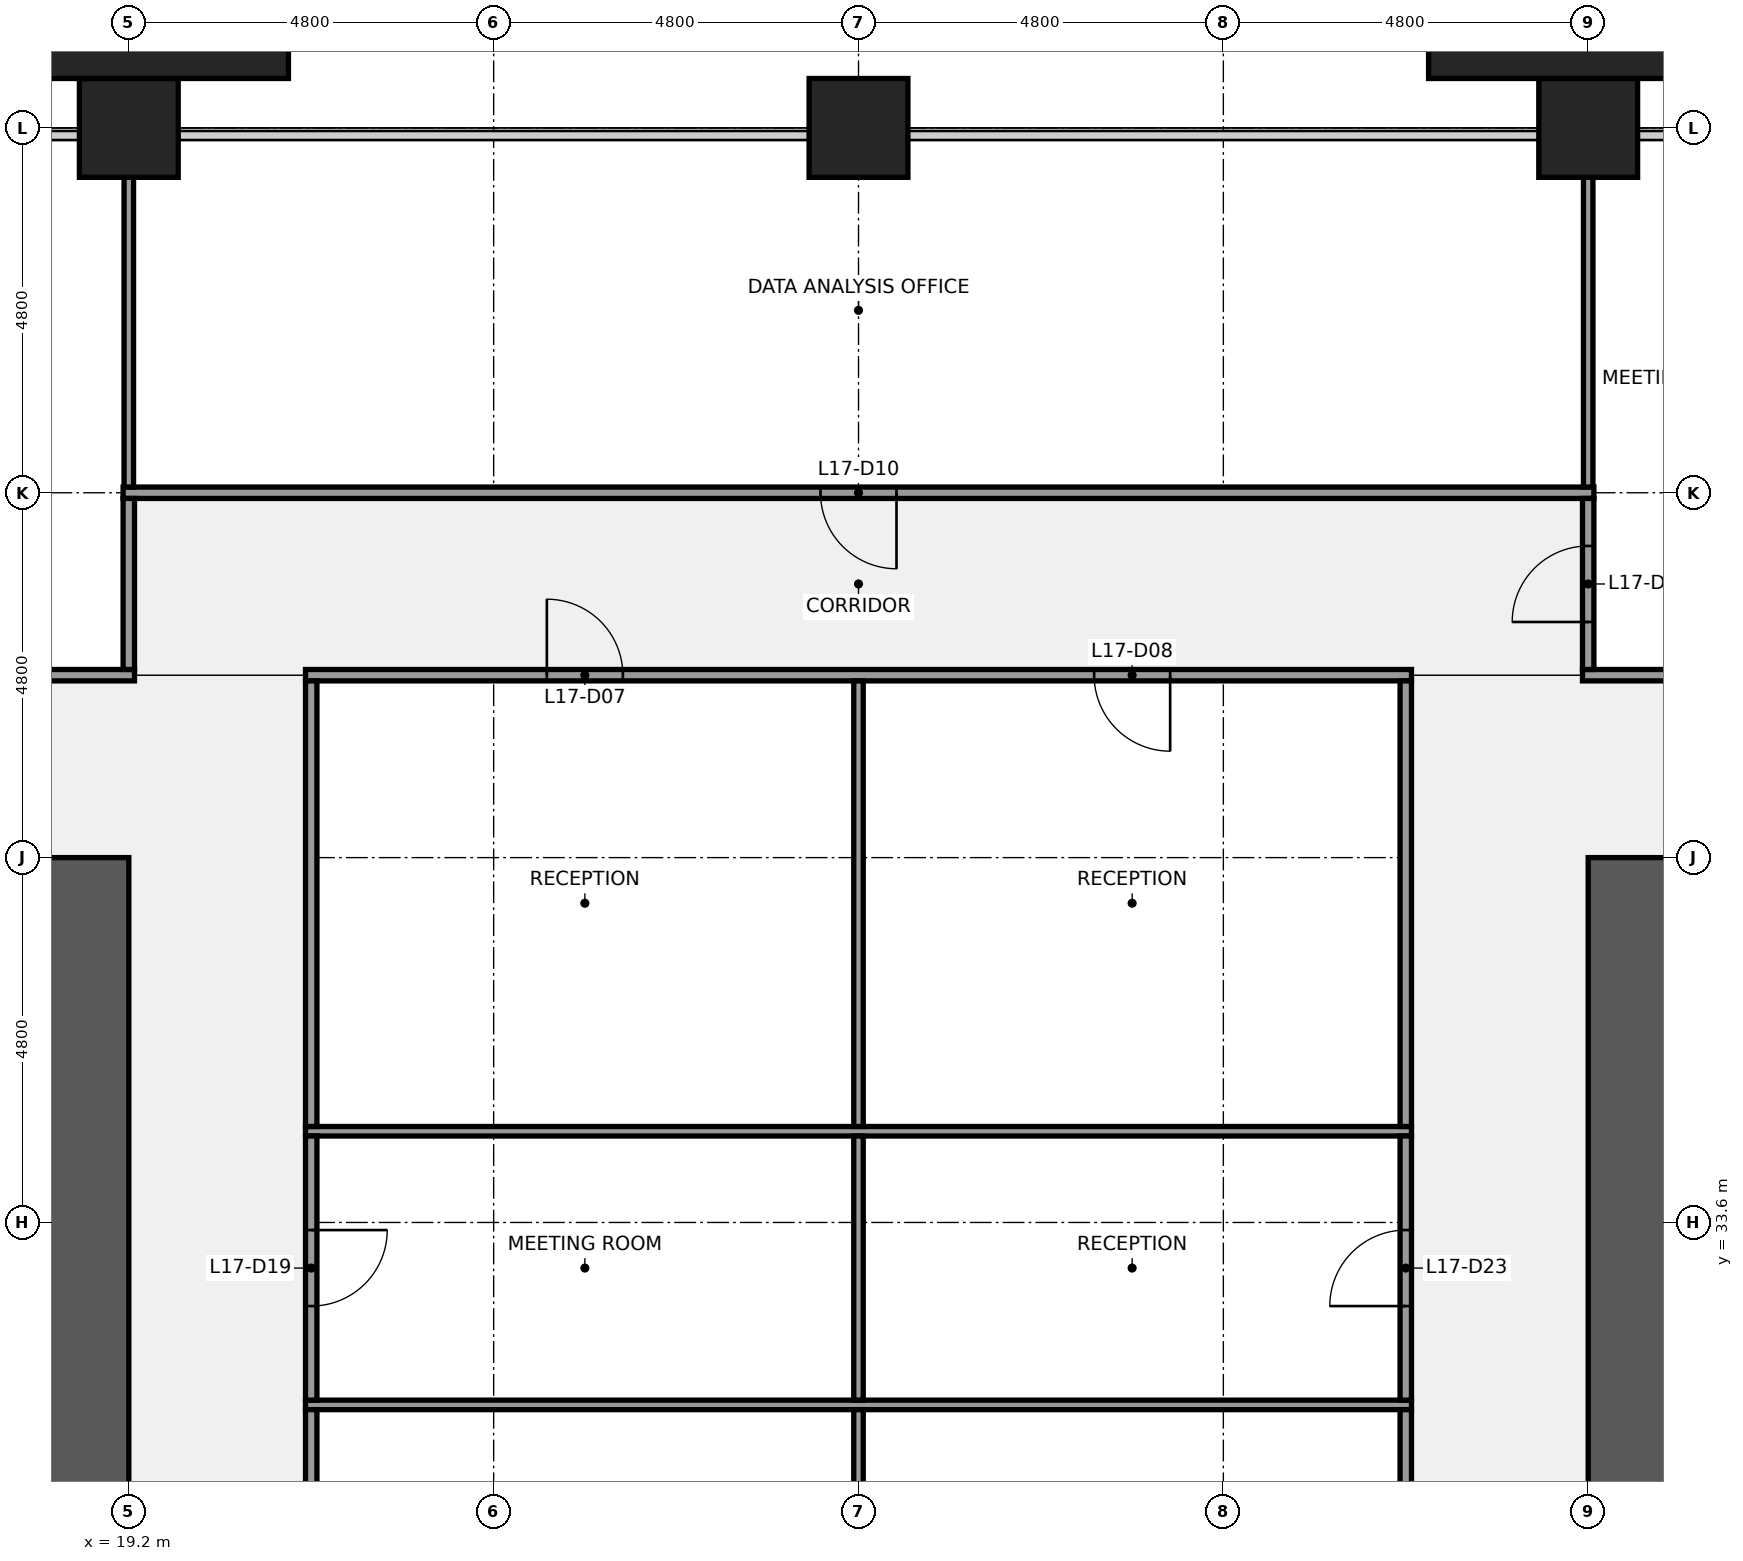
"""IFC4 building model, lengths in metres.
Left out: names, types, materials, properties, quantities, classifications, styles, units other than length and angle.
Written with IfcOpenShell. Run it as: python <this file> out.ifc"""

import sys

from ifc_helpers import new_model, si_unit, direction, frame, frame_2d, origin, origin_2d, place, context, subcontext, project, spatial, rectangle, extrude, element, fill, save


model = new_model("IFC4")
c1 = context("Model", 3, precision=1e-05, world=origin(), true_north=direction((0.0, 1.0)))
c2 = subcontext(c1, "Body", "Model", "MODEL_VIEW")
j1 = project(units=[si_unit("LENGTHUNIT", "METRE"), si_unit("PLANEANGLEUNIT", "RADIAN")], contexts=[c1])
p1 = place(None, origin())
s1 = spatial("IfcSite", under=j1, at=p1, CompositionType="ELEMENT")
p2 = place(p1, origin())
s2 = spatial("IfcBuilding", under=s1, at=p2, CompositionType="ELEMENT")
p3 = place(p2, frame((0.0, 0.0, 79.0)))
s3 = spatial("IfcBuildingStorey", under=s2, at=p3, CompositionType="ELEMENT", Elevation=79.0)
for number, where, z_axis, x_axis in (
    (1, (19.2, 48.0, 0.0), (0.0, 0.0, 1.0), (1.0, 0.0, 0.0)),
    (2, (28.8, 48.0, 0.0), (0.0, 0.0, 1.0), (1.0, 0.0, 0.0)),
    (3, (38.4, 48.0, 0.0), (0.0, 0.0, 1.0), (1.0, 0.0, 0.0)),
):
    element("IfcColumn", number, at=place(p3, frame(where, z_axis=z_axis, x_axis=x_axis)), inside=s3, PredefinedType="COLUMN", context=c2, shape_type="SweptSolid", body=[
        extrude(rectangle(XDim=1.3, YDim=1.3, at=origin_2d()), origin(), (0.0, 0.0, 1.0), 4.0),
    ])
p4 = place(p3, frame((18.6, 38.4, 0.0), z_axis=(0.0, 0.0, 1.0), x_axis=(0.0, -1.0, 0.0)))
e4 = element("IfcWall", 4, at=p4, inside=s3, PredefinedType="SHEAR", context=c2, shape_type="SweptSolid", body=[
    extrude(rectangle(XDim=28.8, YDim=1.2, at=frame_2d((14.4, 0.0))), origin(), (0.0, 0.0, 1.0), 3.84),
])
p5 = place(p4, frame((18.3, 0.0, 0.0)))
e5 = element("IfcOpeningElement", 5, at=p5, cuts=e4, PredefinedType="OPENING", context=c2, shape_type="SweptSolid", body=[
    extrude(rectangle(XDim=1.8, YDim=2.1, at=frame_2d((0.9, 1.05))), frame((0.0, 0.61, 0.0), z_axis=(0.0, -1.0, 0.0), x_axis=(1.0, 0.0, 0.0)), (0.0, 0.0, 1.0), 1.22),
])
p6 = place(p4, frame((8.7, 0.0, 0.0)))
e6 = element("IfcOpeningElement", 6, at=p6, cuts=e4, PredefinedType="OPENING", context=c2, shape_type="SweptSolid", body=[
    extrude(rectangle(XDim=1.8, YDim=2.1, at=frame_2d((0.9, 1.05))), frame((0.0, 0.61, 0.0), z_axis=(0.0, -1.0, 0.0), x_axis=(1.0, 0.0, 0.0)), (0.0, 0.0, 1.0), 1.22),
])
p7 = place(p3, frame((39.0, 9.6, 0.0), z_axis=(0.0, 0.0, 1.0), x_axis=(0.0, 1.0, 0.0)))
e7 = element("IfcWall", 7, at=p7, inside=s3, PredefinedType="SHEAR", context=c2, shape_type="SweptSolid", body=[
    extrude(rectangle(XDim=28.8, YDim=1.2, at=frame_2d((14.4, 0.0))), origin(), (0.0, 0.0, 1.0), 3.84),
])
p8 = place(p7, frame((8.7, 0.0, 0.0)))
e8 = element("IfcOpeningElement", 8, at=p8, cuts=e7, PredefinedType="OPENING", context=c2, shape_type="SweptSolid", body=[
    extrude(rectangle(XDim=1.8, YDim=2.1, at=frame_2d((0.9, 1.05))), frame((0.0, 0.61, 0.0), z_axis=(0.0, -1.0, 0.0), x_axis=(1.0, 0.0, 0.0)), (0.0, 0.0, 1.0), 1.22),
])
p9 = place(p7, frame((18.3, 0.0, 0.0)))
e9 = element("IfcOpeningElement", 9, at=p9, cuts=e7, PredefinedType="OPENING", context=c2, shape_type="SweptSolid", body=[
    extrude(rectangle(XDim=1.8, YDim=2.1, at=frame_2d((0.9, 1.05))), frame((0.0, 0.61, 0.0), z_axis=(0.0, -1.0, 0.0), x_axis=(1.0, 0.0, 0.0)), (0.0, 0.0, 1.0), 1.22),
])
for number, where, z_axis, x_axis in (
    (10, (21.525, 31.2, 0.0), (0.0, 0.0, 1.0), (1.0, 0.0, 0.0)),
    (11, (21.525, 34.8, 0.0), (0.0, 0.0, 1.0), (1.0, 0.0, 0.0)),
):
    element("IfcWall", number, at=place(p3, frame(where, z_axis=z_axis, x_axis=x_axis)), inside=s3, PredefinedType="PARTITIONING", context=c2, shape_type="SweptSolid", body=[
        extrude(rectangle(XDim=14.55, YDim=0.125, at=frame_2d((7.275, 0.0))), origin(), (0.0, 0.0, 1.0), 2.849),
    ])
p10 = place(p3, frame((14.325, 40.8, 0.0), z_axis=(0.0, 0.0, 1.0), x_axis=(1.0, 0.0, 0.0)))
e12 = element("IfcWall", 12, at=p10, inside=s3, PredefinedType="PARTITIONING", context=c2, shape_type="SweptSolid", body=[
    extrude(rectangle(XDim=4.95, YDim=0.15, at=frame_2d((2.475, 0.0))), origin(), (0.0, 0.0, 1.0), 2.849),
])
p11 = place(p10, frame((1.975, 0.0, 0.0)))
e13 = element("IfcOpeningElement", 13, at=p11, cuts=e12, PredefinedType="OPENING", context=c2, shape_type="SweptSolid", body=[
    extrude(rectangle(XDim=1.0, YDim=2.1, at=frame_2d((0.5, 1.05))), frame((0.0, 0.085, 0.0), z_axis=(0.0, -1.0, 0.0), x_axis=(1.0, 0.0, 0.0)), (0.0, 0.0, 1.0), 0.17),
])
p12 = place(p3, frame((21.525, 40.8, 0.0), z_axis=(0.0, 0.0, 1.0), x_axis=(1.0, 0.0, 0.0)))
e14 = element("IfcWall", 14, at=p12, inside=s3, PredefinedType="PARTITIONING", context=c2, shape_type="SweptSolid", body=[
    extrude(rectangle(XDim=14.55, YDim=0.15, at=frame_2d((7.275, 0.0))), origin(), (0.0, 0.0, 1.0), 2.849),
])
p13 = place(p12, frame((3.175, 0.0, 0.0)))
e15 = element("IfcOpeningElement", 15, at=p13, cuts=e14, PredefinedType="OPENING", context=c2, shape_type="SweptSolid", body=[
    extrude(rectangle(XDim=1.0, YDim=2.1, at=frame_2d((0.5, 1.05))), frame((0.0, 0.085, 0.0), z_axis=(0.0, -1.0, 0.0), x_axis=(1.0, 0.0, 0.0)), (0.0, 0.0, 1.0), 0.17),
])
p14 = place(p12, frame((10.375, 0.0, 0.0)))
e16 = element("IfcOpeningElement", 16, at=p14, cuts=e14, PredefinedType="OPENING", context=c2, shape_type="SweptSolid", body=[
    extrude(rectangle(XDim=1.0, YDim=2.1, at=frame_2d((0.5, 1.05))), frame((0.0, 0.085, 0.0), z_axis=(0.0, -1.0, 0.0), x_axis=(1.0, 0.0, 0.0)), (0.0, 0.0, 1.0), 0.17),
])
p15 = place(p3, frame((38.325, 40.8, 0.0), z_axis=(0.0, 0.0, 1.0), x_axis=(1.0, 0.0, 0.0)))
e17 = element("IfcWall", 17, at=p15, inside=s3, PredefinedType="PARTITIONING", context=c2, shape_type="SweptSolid", body=[
    extrude(rectangle(XDim=9.75, YDim=0.15, at=frame_2d((4.875, 0.0))), origin(), (0.0, 0.0, 1.0), 2.849),
])
p16 = place(p15, frame((3.175, 0.0, 0.0)))
e18 = element("IfcOpeningElement", 18, at=p16, cuts=e17, PredefinedType="OPENING", context=c2, shape_type="SweptSolid", body=[
    extrude(rectangle(XDim=1.0, YDim=2.1, at=frame_2d((0.5, 1.05))), frame((0.0, 0.085, 0.0), z_axis=(0.0, -1.0, 0.0), x_axis=(1.0, 0.0, 0.0)), (0.0, 0.0, 1.0), 0.17),
])
p17 = place(p3, frame((19.125, 43.2, 0.0), z_axis=(0.0, 0.0, 1.0), x_axis=(1.0, 0.0, 0.0)))
e19 = element("IfcWall", 19, at=p17, inside=s3, PredefinedType="PARTITIONING", context=c2, shape_type="SweptSolid", body=[
    extrude(rectangle(XDim=19.35, YDim=0.15, at=frame_2d((9.675, 0.0))), origin(), (0.0, 0.0, 1.0), 2.849),
])
p18 = place(p17, frame((9.175, 0.0, 0.0)))
e20 = element("IfcOpeningElement", 20, at=p18, cuts=e19, PredefinedType="OPENING", context=c2, shape_type="SweptSolid", body=[
    extrude(rectangle(XDim=1.0, YDim=2.1, at=frame_2d((0.5, 1.05))), frame((0.0, 0.085, 0.0), z_axis=(0.0, -1.0, 0.0), x_axis=(1.0, 0.0, 0.0)), (0.0, 0.0, 1.0), 0.17),
])
p19 = place(p3, frame((19.2, 43.275, 0.0), z_axis=(0.0, 0.0, 1.0), x_axis=(0.0, 1.0, 0.0)))
e21 = element("IfcWall", 21, at=p19, inside=s3, PredefinedType="PARTITIONING", context=c2, shape_type="SweptSolid", body=[
    extrude(rectangle(XDim=4.075, YDim=0.125, at=frame_2d((2.038, 0.0))), origin(), (0.0, 0.0, 1.0), 2.849),
])
p20 = place(p3, frame((19.2, 40.875, 0.0), z_axis=(0.0, 0.0, 1.0), x_axis=(0.0, 1.0, 0.0)))
e22 = element("IfcWall", 22, at=p20, inside=s3, PredefinedType="PARTITIONING", context=c2, shape_type="SweptSolid", body=[
    extrude(rectangle(XDim=2.25, YDim=0.15, at=frame_2d((1.125, 0.0))), origin(), (0.0, 0.0, 1.0), 2.849),
])
p21 = place(p3, frame((21.6, 22.863, 0.0), z_axis=(0.0, 0.0, 1.0), x_axis=(0.0, 1.0, 0.0)))
e23 = element("IfcWall", 23, at=p21, inside=s3, PredefinedType="PARTITIONING", context=c2, shape_type="SweptSolid", body=[
    extrude(rectangle(XDim=8.275, YDim=0.15, at=frame_2d((4.137, 0.0))), origin(), (0.0, 0.0, 1.0), 2.849),
])
p22 = place(p21, frame((3.637, 0.0, 0.0)))
e24 = element("IfcOpeningElement", 24, at=p22, cuts=e23, PredefinedType="OPENING", context=c2, shape_type="SweptSolid", body=[
    extrude(rectangle(XDim=1.0, YDim=2.1, at=frame_2d((0.5, 1.05))), frame((0.0, 0.085, 0.0), z_axis=(0.0, -1.0, 0.0), x_axis=(1.0, 0.0, 0.0)), (0.0, 0.0, 1.0), 0.17),
])
p23 = place(p3, frame((21.6, 31.262, 0.0), z_axis=(0.0, 0.0, 1.0), x_axis=(0.0, 1.0, 0.0)))
e25 = element("IfcWall", 25, at=p23, inside=s3, PredefinedType="PARTITIONING", context=c2, shape_type="SweptSolid", body=[
    extrude(rectangle(XDim=3.475, YDim=0.15, at=frame_2d((1.738, 0.0))), origin(), (0.0, 0.0, 1.0), 2.849),
])
p24 = place(p23, frame((1.238, 0.0, 0.0)))
e26 = element("IfcOpeningElement", 26, at=p24, cuts=e25, PredefinedType="OPENING", context=c2, shape_type="SweptSolid", body=[
    extrude(rectangle(XDim=1.0, YDim=2.1, at=frame_2d((0.5, 1.05))), frame((0.0, 0.085, 0.0), z_axis=(0.0, -1.0, 0.0), x_axis=(1.0, 0.0, 0.0)), (0.0, 0.0, 1.0), 0.17),
])
p25 = place(p3, frame((21.6, 34.863, 0.0), z_axis=(0.0, 0.0, 1.0), x_axis=(0.0, 1.0, 0.0)))
e27 = element("IfcWall", 27, at=p25, inside=s3, PredefinedType="PARTITIONING", context=c2, shape_type="SweptSolid", body=[
    extrude(rectangle(XDim=5.863, YDim=0.15, at=frame_2d((2.931, 0.0))), origin(), (0.0, 0.0, 1.0), 2.849),
])
p26 = place(p3, frame((28.8, 22.863, 0.0), z_axis=(0.0, 0.0, 1.0), x_axis=(0.0, 1.0, 0.0)))
e28 = element("IfcWall", 28, at=p26, inside=s3, PredefinedType="PARTITIONING", context=c2, shape_type="SweptSolid", body=[
    extrude(rectangle(XDim=8.275, YDim=0.125, at=frame_2d((4.137, 0.0))), origin(), (0.0, 0.0, 1.0), 2.849),
])
p27 = place(p3, frame((28.8, 31.262, 0.0), z_axis=(0.0, 0.0, 1.0), x_axis=(0.0, 1.0, 0.0)))
e29 = element("IfcWall", 29, at=p27, inside=s3, PredefinedType="PARTITIONING", context=c2, shape_type="SweptSolid", body=[
    extrude(rectangle(XDim=3.475, YDim=0.125, at=frame_2d((1.738, 0.0))), origin(), (0.0, 0.0, 1.0), 2.849),
])
p28 = place(p3, frame((28.8, 34.863, 0.0), z_axis=(0.0, 0.0, 1.0), x_axis=(0.0, 1.0, 0.0)))
e30 = element("IfcWall", 30, at=p28, inside=s3, PredefinedType="PARTITIONING", context=c2, shape_type="SweptSolid", body=[
    extrude(rectangle(XDim=5.863, YDim=0.125, at=frame_2d((2.931, 0.0))), origin(), (0.0, 0.0, 1.0), 2.849),
])
p29 = place(p3, frame((36.0, 22.863, 0.0), z_axis=(0.0, 0.0, 1.0), x_axis=(0.0, 1.0, 0.0)))
e31 = element("IfcWall", 31, at=p29, inside=s3, PredefinedType="PARTITIONING", context=c2, shape_type="SweptSolid", body=[
    extrude(rectangle(XDim=8.275, YDim=0.15, at=frame_2d((4.137, 0.0))), origin(), (0.0, 0.0, 1.0), 2.849),
])
p30 = place(p29, frame((3.637, 0.0, 0.0)))
e32 = element("IfcOpeningElement", 32, at=p30, cuts=e31, PredefinedType="OPENING", context=c2, shape_type="SweptSolid", body=[
    extrude(rectangle(XDim=1.0, YDim=2.1, at=frame_2d((0.5, 1.05))), frame((0.0, 0.085, 0.0), z_axis=(0.0, -1.0, 0.0), x_axis=(1.0, 0.0, 0.0)), (0.0, 0.0, 1.0), 0.17),
])
p31 = place(p3, frame((36.0, 31.262, 0.0), z_axis=(0.0, 0.0, 1.0), x_axis=(0.0, 1.0, 0.0)))
e33 = element("IfcWall", 33, at=p31, inside=s3, PredefinedType="PARTITIONING", context=c2, shape_type="SweptSolid", body=[
    extrude(rectangle(XDim=3.475, YDim=0.15, at=frame_2d((1.738, 0.0))), origin(), (0.0, 0.0, 1.0), 2.849),
])
p32 = place(p31, frame((1.238, 0.0, 0.0)))
e34 = element("IfcOpeningElement", 34, at=p32, cuts=e33, PredefinedType="OPENING", context=c2, shape_type="SweptSolid", body=[
    extrude(rectangle(XDim=1.0, YDim=2.1, at=frame_2d((0.5, 1.05))), frame((0.0, 0.085, 0.0), z_axis=(0.0, -1.0, 0.0), x_axis=(1.0, 0.0, 0.0)), (0.0, 0.0, 1.0), 0.17),
])
p33 = place(p3, frame((36.0, 34.863, 0.0), z_axis=(0.0, 0.0, 1.0), x_axis=(0.0, 1.0, 0.0)))
e35 = element("IfcWall", 35, at=p33, inside=s3, PredefinedType="PARTITIONING", context=c2, shape_type="SweptSolid", body=[
    extrude(rectangle(XDim=5.863, YDim=0.15, at=frame_2d((2.931, 0.0))), origin(), (0.0, 0.0, 1.0), 2.849),
])
p34 = place(p3, frame((38.4, 43.275, 0.0), z_axis=(0.0, 0.0, 1.0), x_axis=(0.0, 1.0, 0.0)))
e36 = element("IfcWall", 36, at=p34, inside=s3, PredefinedType="PARTITIONING", context=c2, shape_type="SweptSolid", body=[
    extrude(rectangle(XDim=4.075, YDim=0.125, at=frame_2d((2.038, 0.0))), origin(), (0.0, 0.0, 1.0), 2.849),
])
p35 = place(p3, frame((38.4, 40.875, 0.0), z_axis=(0.0, 0.0, 1.0), x_axis=(0.0, 1.0, 0.0)))
e37 = element("IfcWall", 37, at=p35, inside=s3, PredefinedType="PARTITIONING", context=c2, shape_type="SweptSolid", body=[
    extrude(rectangle(XDim=2.25, YDim=0.15, at=frame_2d((1.125, 0.0))), origin(), (0.0, 0.0, 1.0), 2.849),
])
p36 = place(p35, frame((0.625, 0.0, 0.0)))
e38 = element("IfcOpeningElement", 38, at=p36, cuts=e37, PredefinedType="OPENING", context=c2, shape_type="SweptSolid", body=[
    extrude(rectangle(XDim=1.0, YDim=2.1, at=frame_2d((0.5, 1.05))), frame((0.0, 0.085, 0.0), z_axis=(0.0, -1.0, 0.0), x_axis=(1.0, 0.0, 0.0)), (0.0, 0.0, 1.0), 0.17),
])
for number, where, z_axis, x_axis in (
    (39, (19.2, 49.075, 0.0), (0.0, 0.0, 1.0), (1.0, 0.0, 0.0)),
    (40, (38.4, 49.075, 0.0), (0.0, 0.0, 1.0), (1.0, 0.0, 0.0)),
):
    element("IfcColumn", number, at=place(p3, frame(where, z_axis=z_axis, x_axis=x_axis)), inside=s3, PredefinedType="PILASTER", context=c2, shape_type="SweptSolid", body=[
        extrude(rectangle(XDim=4.2, YDim=0.85, at=origin_2d()), origin(), (0.0, 0.0, 1.0), 4.0),
    ])
p37 = place(p13, origin())
e41 = element("IfcDoor", 41, at=p37, inside=s3, OperationType="SINGLE_SWING_LEFT", PredefinedType="DOOR", context=c2, shape_type="SweptSolid", body=[
    extrude(rectangle(XDim=1.0, YDim=2.1, at=frame_2d((0.5, 1.05))), frame((0.0, 0.025, 0.0), z_axis=(0.0, -1.0, 0.0), x_axis=(1.0, 0.0, 0.0)), (0.0, 0.0, 1.0), 0.05),
])
fill(e15, e41)
p38 = place(p14, origin())
e42 = element("IfcDoor", 42, at=p38, inside=s3, OperationType="SINGLE_SWING_RIGHT", PredefinedType="DOOR", context=c2, shape_type="SweptSolid", body=[
    extrude(rectangle(XDim=1.0, YDim=2.1, at=frame_2d((0.5, 1.05))), frame((0.0, 0.025, 0.0), z_axis=(0.0, -1.0, 0.0), x_axis=(1.0, 0.0, 0.0)), (0.0, 0.0, 1.0), 0.05),
])
fill(e16, e42)
p39 = place(p18, origin())
e43 = element("IfcDoor", 43, at=p39, inside=s3, OperationType="SINGLE_SWING_RIGHT", PredefinedType="DOOR", context=c2, shape_type="SweptSolid", body=[
    extrude(rectangle(XDim=1.0, YDim=2.1, at=frame_2d((0.5, 1.05))), frame((0.0, 0.025, 0.0), z_axis=(0.0, -1.0, 0.0), x_axis=(1.0, 0.0, 0.0)), (0.0, 0.0, 1.0), 0.05),
])
fill(e20, e43)
p40 = place(p24, origin())
e44 = element("IfcDoor", 44, at=p40, inside=s3, OperationType="SINGLE_SWING_RIGHT", PredefinedType="DOOR", context=c2, shape_type="SweptSolid", body=[
    extrude(rectangle(XDim=1.0, YDim=2.1, at=frame_2d((0.5, 1.05))), frame((0.0, 0.025, 0.0), z_axis=(0.0, -1.0, 0.0), x_axis=(1.0, 0.0, 0.0)), (0.0, 0.0, 1.0), 0.05),
])
fill(e26, e44)
p41 = place(p32, origin())
e45 = element("IfcDoor", 45, at=p41, inside=s3, OperationType="SINGLE_SWING_LEFT", PredefinedType="DOOR", context=c2, shape_type="SweptSolid", body=[
    extrude(rectangle(XDim=1.0, YDim=2.1, at=frame_2d((0.5, 1.05))), frame((0.0, 0.025, 0.0), z_axis=(0.0, -1.0, 0.0), x_axis=(1.0, 0.0, 0.0)), (0.0, 0.0, 1.0), 0.05),
])
fill(e34, e45)
p42 = place(p36, origin())
e46 = element("IfcDoor", 46, at=p42, inside=s3, OperationType="SINGLE_SWING_LEFT", PredefinedType="DOOR", context=c2, shape_type="SweptSolid", body=[
    extrude(rectangle(XDim=1.0, YDim=2.1, at=frame_2d((0.5, 1.05))), frame((0.0, 0.025, 0.0), z_axis=(0.0, -1.0, 0.0), x_axis=(1.0, 0.0, 0.0)), (0.0, 0.0, 1.0), 0.05),
])
fill(e38, e46)
save(model, sys.argv[1])
